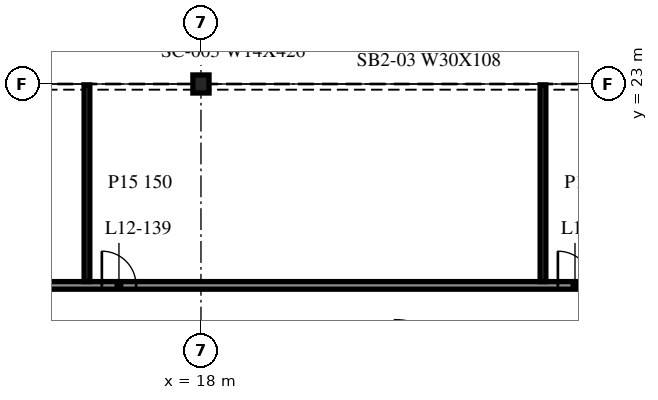
"""IFC4 building model, lengths in metres.
Left out: names, types, materials, properties, quantities, classifications, styles, units other than length and angle.
Written with IfcOpenShell. Run it as: python <this file> out.ifc"""

import sys

from ifc_helpers import new_model, si_unit, direction, frame, frame_2d, origin, origin_2d, place, context, subcontext, project, spatial, rectangle, i_section, extrude, element, fill, save


model = new_model("IFC4")
c1 = context("Model", 3, precision=1e-05, world=origin(), true_north=direction((0.0, 1.0)))
c2 = subcontext(c1, "Body", "Model", "MODEL_VIEW")
j1 = project(units=[si_unit("LENGTHUNIT", "METRE"), si_unit("PLANEANGLEUNIT", "RADIAN")], contexts=[c1])
p1 = place(None, origin())
s1 = spatial("IfcSite", under=j1, at=p1, CompositionType="ELEMENT")
p2 = place(p1, origin())
s2 = spatial("IfcBuilding", under=s1, at=p2, CompositionType="ELEMENT")
p3 = place(p2, frame((0.0, 0.0, 54.6)))
s3 = spatial("IfcBuildingStorey", under=s2, at=p3, CompositionType="ELEMENT", Elevation=54.6)
p4 = place(p3, frame((18.0, 23.0, -0.34), z_axis=(0.0, 0.0, 1.0), x_axis=(1.0, 0.0, 0.0)))
e1 = element("IfcColumn", 1, at=p4, inside=s3, PredefinedType="COLUMN", context=c2, shape_type="SweptSolid", body=[
    extrude(i_section(OverallWidth=0.424, OverallDepth=0.475, WebThickness=0.048, FlangeThickness=0.077, at=origin_2d()), origin(), (0.0, 0.0, 1.0), 4.3),
])
p5 = place(p3, frame((-41.708, 17.7, 0.0), z_axis=(0.0, 0.0, 1.0), x_axis=(1.0, 0.0, 0.0)))
e2 = element("IfcWall", 2, at=p5, inside=s3, PredefinedType="PARTITIONING", context=c2, shape_type="SweptSolid", body=[
    extrude(rectangle(XDim=95.416, YDim=0.2, at=frame_2d((47.708, 0.0))), origin(), (0.0, 0.0, 1.0), 3.96),
])
p6 = place(p5, frame((7.5, 0.0, 0.0)))
e3 = element("IfcOpeningElement", 3, at=p6, cuts=e2, PredefinedType="OPENING", context=c2, shape_type="SweptSolid", body=[
    extrude(rectangle(XDim=0.9, YDim=2.1, at=frame_2d((0.45, 1.05))), frame((0.0, 0.11, 0.0), z_axis=(0.0, -1.0, 0.0), x_axis=(1.0, 0.0, 0.0)), (0.0, 0.0, 1.0), 0.22),
])
p7 = place(p5, frame((13.5, 0.0, 0.0)))
e4 = element("IfcOpeningElement", 4, at=p7, cuts=e2, PredefinedType="OPENING", context=c2, shape_type="SweptSolid", body=[
    extrude(rectangle(XDim=0.9, YDim=2.1, at=frame_2d((0.45, 1.05))), frame((0.0, 0.11, 0.0), z_axis=(0.0, -1.0, 0.0), x_axis=(1.0, 0.0, 0.0)), (0.0, 0.0, 1.0), 0.22),
])
p8 = place(p5, frame((19.5, 0.0, 0.0)))
e5 = element("IfcOpeningElement", 5, at=p8, cuts=e2, PredefinedType="OPENING", context=c2, shape_type="SweptSolid", body=[
    extrude(rectangle(XDim=0.9, YDim=2.1, at=frame_2d((0.45, 1.05))), frame((0.0, 0.11, 0.0), z_axis=(0.0, -1.0, 0.0), x_axis=(1.0, 0.0, 0.0)), (0.0, 0.0, 1.0), 0.22),
])
p9 = place(p5, frame((31.5, 0.0, 0.0)))
e6 = element("IfcOpeningElement", 6, at=p9, cuts=e2, PredefinedType="OPENING", context=c2, shape_type="SweptSolid", body=[
    extrude(rectangle(XDim=0.9, YDim=2.1, at=frame_2d((0.45, 1.05))), frame((0.0, 0.11, 0.0), z_axis=(0.0, -1.0, 0.0), x_axis=(1.0, 0.0, 0.0)), (0.0, 0.0, 1.0), 0.22),
])
p10 = place(p5, frame((34.5, 0.0, 0.0)))
e7 = element("IfcOpeningElement", 7, at=p10, cuts=e2, PredefinedType="OPENING", context=c2, shape_type="SweptSolid", body=[
    extrude(rectangle(XDim=0.9, YDim=2.1, at=frame_2d((0.45, 1.05))), frame((0.0, 0.11, 0.0), z_axis=(0.0, -1.0, 0.0), x_axis=(1.0, 0.0, 0.0)), (0.0, 0.0, 1.0), 0.22),
])
p11 = place(p5, frame((43.5, 0.0, 0.0)))
e8 = element("IfcOpeningElement", 8, at=p11, cuts=e2, PredefinedType="OPENING", context=c2, shape_type="SweptSolid", body=[
    extrude(rectangle(XDim=0.9, YDim=2.1, at=frame_2d((0.45, 1.05))), frame((0.0, 0.11, 0.0), z_axis=(0.0, -1.0, 0.0), x_axis=(1.0, 0.0, 0.0)), (0.0, 0.0, 1.0), 0.22),
])
p12 = place(p5, frame((47.3, 0.0, 0.0)))
e9 = element("IfcOpeningElement", 9, at=p12, cuts=e2, PredefinedType="OPENING", context=c2, shape_type="SweptSolid", body=[
    extrude(rectangle(XDim=0.9, YDim=2.1, at=frame_2d((0.45, 1.05))), frame((0.0, 0.11, 0.0), z_axis=(0.0, -1.0, 0.0), x_axis=(1.0, 0.0, 0.0)), (0.0, 0.0, 1.0), 0.22),
])
p13 = place(p5, frame((51.1, 0.0, 0.0)))
e10 = element("IfcOpeningElement", 10, at=p13, cuts=e2, PredefinedType="OPENING", context=c2, shape_type="SweptSolid", body=[
    extrude(rectangle(XDim=0.9, YDim=2.1, at=frame_2d((0.45, 1.05))), frame((0.0, 0.11, 0.0), z_axis=(0.0, -1.0, 0.0), x_axis=(1.0, 0.0, 0.0)), (0.0, 0.0, 1.0), 0.22),
])
p14 = place(p5, frame((57.1, 0.0, 0.0)))
e11 = element("IfcOpeningElement", 11, at=p14, cuts=e2, PredefinedType="OPENING", context=c2, shape_type="SweptSolid", body=[
    extrude(rectangle(XDim=0.9, YDim=2.1, at=frame_2d((0.45, 1.05))), frame((0.0, 0.11, 0.0), z_axis=(0.0, -1.0, 0.0), x_axis=(1.0, 0.0, 0.0)), (0.0, 0.0, 1.0), 0.22),
])
p15 = place(p5, frame((69.1, 0.0, 0.0)))
e12 = element("IfcOpeningElement", 12, at=p15, cuts=e2, PredefinedType="OPENING", context=c2, shape_type="SweptSolid", body=[
    extrude(rectangle(XDim=0.9, YDim=2.1, at=frame_2d((0.45, 1.05))), frame((0.0, 0.11, 0.0), z_axis=(0.0, -1.0, 0.0), x_axis=(1.0, 0.0, 0.0)), (0.0, 0.0, 1.0), 0.22),
])
p16 = place(p5, frame((72.1, 0.0, 0.0)))
e13 = element("IfcOpeningElement", 13, at=p16, cuts=e2, PredefinedType="OPENING", context=c2, shape_type="SweptSolid", body=[
    extrude(rectangle(XDim=0.9, YDim=2.1, at=frame_2d((0.45, 1.05))), frame((0.0, 0.11, 0.0), z_axis=(0.0, -1.0, 0.0), x_axis=(1.0, 0.0, 0.0)), (0.0, 0.0, 1.0), 0.22),
])
p17 = place(p5, frame((81.1, 0.0, 0.0)))
e14 = element("IfcOpeningElement", 14, at=p17, cuts=e2, PredefinedType="OPENING", context=c2, shape_type="SweptSolid", body=[
    extrude(rectangle(XDim=0.9, YDim=2.1, at=frame_2d((0.45, 1.05))), frame((0.0, 0.11, 0.0), z_axis=(0.0, -1.0, 0.0), x_axis=(1.0, 0.0, 0.0)), (0.0, 0.0, 1.0), 0.22),
])
p18 = place(p5, frame((87.1, 0.0, 0.0)))
e15 = element("IfcOpeningElement", 15, at=p18, cuts=e2, PredefinedType="OPENING", context=c2, shape_type="SweptSolid", body=[
    extrude(rectangle(XDim=0.9, YDim=2.1, at=frame_2d((0.45, 1.05))), frame((0.0, 0.11, 0.0), z_axis=(0.0, -1.0, 0.0), x_axis=(1.0, 0.0, 0.0)), (0.0, 0.0, 1.0), 0.22),
])
for number, where, z_axis, x_axis in (
    (16, (15.0, 17.8, 0.0), (0.0, 0.0, 1.0), (0.0, 1.0, 0.0)),
    (17, (27.0, 17.8, 0.0), (0.0, 0.0, 1.0), (0.0, 1.0, 0.0)),
):
    element("IfcWall", number, at=place(p3, frame(where, z_axis=z_axis, x_axis=x_axis)), inside=s3, PredefinedType="PARTITIONING", context=c2, shape_type="SweptSolid", body=[
        extrude(rectangle(XDim=5.175, YDim=0.15, at=frame_2d((2.587, 0.0))), origin(), (0.0, 0.0, 1.0), 3.96),
    ])
p19 = place(p14, origin())
e18 = element("IfcDoor", 18, at=p19, inside=s3, OperationType="SINGLE_SWING_RIGHT", PredefinedType="DOOR", context=c2, shape_type="SweptSolid", body=[
    extrude(rectangle(XDim=0.9, YDim=2.1, at=frame_2d((0.45, 1.05))), frame((0.0, 0.025, 0.0), z_axis=(0.0, -1.0, 0.0), x_axis=(1.0, 0.0, 0.0)), (0.0, 0.0, 1.0), 0.05),
])
fill(e11, e18)
p20 = place(p15, origin())
e19 = element("IfcDoor", 19, at=p20, inside=s3, OperationType="SINGLE_SWING_RIGHT", PredefinedType="DOOR", context=c2, shape_type="SweptSolid", body=[
    extrude(rectangle(XDim=0.9, YDim=2.1, at=frame_2d((0.45, 1.05))), frame((0.0, 0.025, 0.0), z_axis=(0.0, -1.0, 0.0), x_axis=(1.0, 0.0, 0.0)), (0.0, 0.0, 1.0), 0.05),
])
fill(e12, e19)
save(model, sys.argv[1])
